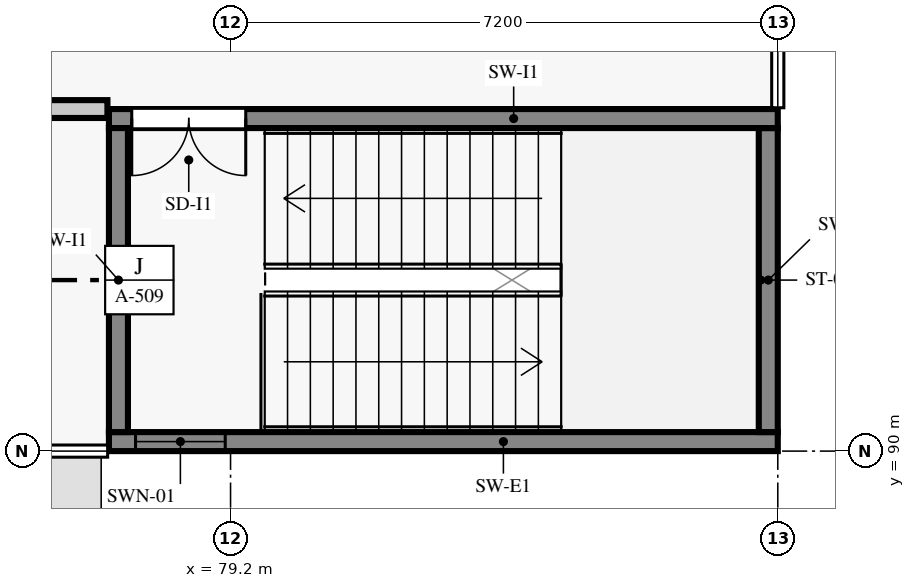
"""IFC4 building model, lengths in metres.
Left out: names, types, materials, properties, quantities, classifications, styles, units other than length and angle.
Written with IfcOpenShell. Run it as: python <this file> out.ifc"""

import sys

from ifc_helpers import new_model, si_unit, direction, frame, frame_2d, origin, place, context, subcontext, project, spatial, rectangle, extrude, element, fill, save


model = new_model("IFC4")
c1 = context("Model", 3, precision=1e-05, world=origin(), true_north=direction((0.0, 1.0)))
c2 = subcontext(c1, "Body", "Model", "MODEL_VIEW")
j1 = project(units=[si_unit("LENGTHUNIT", "METRE"), si_unit("PLANEANGLEUNIT", "RADIAN")], contexts=[c1])
p1 = place(None, origin())
s1 = spatial("IfcSite", under=j1, at=p1, CompositionType="ELEMENT")
p2 = place(p1, origin())
s2 = spatial("IfcBuilding", under=s1, at=p2, CompositionType="ELEMENT")
p3 = place(p2, frame((0.0, 0.0, 18.0)))
s3 = spatial("IfcBuildingStorey", under=s2, at=p3, CompositionType="ELEMENT", Elevation=18.0)
p4 = place(p3, frame((77.6, 90.125, 0.0), z_axis=(0.0, 0.0, 1.0), x_axis=(1.0, 0.0, 0.0)))
e1 = element("IfcWall", 1, at=p4, inside=s3, PredefinedType="SHEAR", context=c2, shape_type="SweptSolid", body=[
    extrude(rectangle(XDim=8.8, YDim=0.25, at=frame_2d((4.4, 0.0))), origin(), (0.0, 0.0, 1.0), 3.94),
])
p5 = place(p4, frame((0.35, 0.0, 0.92)))
e2 = element("IfcOpeningElement", 2, at=p5, cuts=e1, PredefinedType="OPENING", context=c2, shape_type="SweptSolid", body=[
    extrude(rectangle(XDim=1.18, YDim=1.48, at=frame_2d((0.59, 0.74))), frame((0.0, 0.135, 0.0), z_axis=(0.0, -1.0, 0.0), x_axis=(1.0, 0.0, 0.0)), (0.0, 0.0, 1.0), 0.27),
])
p6 = place(p3, frame((86.275, 90.25, 0.0), z_axis=(0.0, 0.0, 1.0), x_axis=(0.0, 1.0, 0.0)))
e3 = element("IfcWall", 3, at=p6, inside=s3, PredefinedType="SHEAR", context=c2, shape_type="SweptSolid", body=[
    extrude(rectangle(XDim=4.0, YDim=0.25, at=frame_2d((2.0, 0.0))), origin(), (0.0, 0.0, 1.0), 3.94),
])
p7 = place(p3, frame((86.4, 94.375, 0.0), z_axis=(0.0, 0.0, 1.0), x_axis=(-1.0, 0.0, 0.0)))
e4 = element("IfcWall", 4, at=p7, inside=s3, PredefinedType="SHEAR", context=c2, shape_type="SweptSolid", body=[
    extrude(rectangle(XDim=8.8, YDim=0.25, at=frame_2d((4.4, 0.0))), origin(), (0.0, 0.0, 1.0), 3.94),
])
p8 = place(p7, frame((7.0, 0.0, 0.0)))
e5 = element("IfcOpeningElement", 5, at=p8, cuts=e4, PredefinedType="OPENING", context=c2, shape_type="SweptSolid", body=[
    extrude(rectangle(XDim=1.5, YDim=2.15, at=frame_2d((0.75, 1.075))), frame((0.0, 0.135, 0.0), z_axis=(0.0, -1.0, 0.0), x_axis=(1.0, 0.0, 0.0)), (0.0, 0.0, 1.0), 0.27),
])
p9 = place(p3, frame((77.725, 94.25, 0.0), z_axis=(0.0, 0.0, 1.0), x_axis=(0.0, -1.0, 0.0)))
e6 = element("IfcWall", 6, at=p9, inside=s3, PredefinedType="SHEAR", context=c2, shape_type="SweptSolid", body=[
    extrude(rectangle(XDim=4.0, YDim=0.25, at=frame_2d((2.0, 0.0))), origin(), (0.0, 0.0, 1.0), 3.94),
])
p10 = place(p3, frame((71.02, 94.5, 0.0), z_axis=(0.0, 0.0, 1.0), x_axis=(1.0, 0.0, 0.0)))
e7 = element("IfcWall", 7, at=p10, inside=s3, PredefinedType="PARTITIONING", context=c2, shape_type="SweptSolid", body=[
    extrude(rectangle(XDim=6.56, YDim=0.235, at=frame_2d((3.28, 0.0))), origin(), (0.0, 0.0, 1.0), 3.39),
])
p11 = place(p10, frame((4.05, 0.0, 0.0)))
e8 = element("IfcOpeningElement", 8, at=p11, cuts=e7, PredefinedType="OPENING", context=c2, shape_type="SweptSolid", body=[
    extrude(rectangle(XDim=0.94, YDim=2.08, at=frame_2d((0.47, 1.04))), frame((0.0, 0.127, 0.0), z_axis=(0.0, -1.0, 0.0), x_axis=(1.0, 0.0, 0.0)), (0.0, 0.0, 1.0), 0.255),
])
p12 = place(p5, origin())
e9 = element("IfcWindow", 9, at=p12, inside=s3, PartitioningType="SINGLE_PANEL", PredefinedType="WINDOW", context=c2, shape_type="SweptSolid", body=[
    extrude(rectangle(XDim=1.18, YDim=1.48, at=frame_2d((0.59, 0.74))), frame((0.0, 0.03, 0.0), z_axis=(0.0, -1.0, 0.0), x_axis=(1.0, 0.0, 0.0)), (0.0, 0.0, 1.0), 0.06),
])
fill(e2, e9)
p13 = place(p8, origin())
e10 = element("IfcDoor", 10, at=p13, inside=s3, OperationType="DOUBLE_DOOR_SINGLE_SWING", PredefinedType="DOOR", context=c2, shape_type="SweptSolid", body=[
    extrude(rectangle(XDim=1.5, YDim=2.15, at=frame_2d((0.75, 1.075))), frame((0.0, 0.025, 0.0), z_axis=(0.0, -1.0, 0.0), x_axis=(1.0, 0.0, 0.0)), (0.0, 0.0, 1.0), 0.05),
])
fill(e5, e10)
save(model, sys.argv[1])
